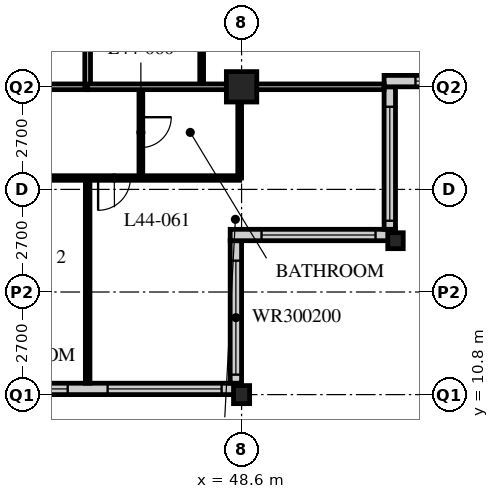
"""IFC4 building model, lengths in metres.
Left out: names, types, materials, properties, quantities, classifications, styles, units other than length and angle.
Written with IfcOpenShell. Run it as: python <this file> out.ifc"""

import sys

from ifc_helpers import new_model, si_unit, direction, frame, frame_2d, origin, origin_2d, place, context, subcontext, project, spatial, rectangle, hollow_rectangle, i_section, extrude, element, fill, save


model = new_model("IFC4")
c1 = context("Model", 3, precision=1e-05, world=origin(), true_north=direction((0.0, 1.0)))
c2 = subcontext(c1, "Body", "Model", "MODEL_VIEW")
j1 = project(units=[si_unit("LENGTHUNIT", "METRE"), si_unit("PLANEANGLEUNIT", "RADIAN")], contexts=[c1])
p1 = place(None, origin())
s1 = spatial("IfcSite", under=j1, at=p1, CompositionType="ELEMENT")
p2 = place(p1, origin())
s2 = spatial("IfcBuilding", under=s1, at=p2, CompositionType="ELEMENT")
p3 = place(p2, frame((0.0, 0.0, 174.0)))
s3 = spatial("IfcBuildingStorey", under=s2, at=p3, CompositionType="ELEMENT", Elevation=174.0)
p4 = place(p3, frame((48.6, 10.8, 0.0), z_axis=(0.0, 0.0, 1.0), x_axis=(1.0, 0.0, 0.0)))
e1 = element("IfcColumn", 1, at=p4, inside=s3, PredefinedType="COLUMN", context=c2, shape_type="SweptSolid", body=[
    extrude(i_section(OverallWidth=0.424, OverallDepth=0.475, WebThickness=0.048, FlangeThickness=0.077, FilletRadius=0.015, at=origin_2d()), origin(), (0.0, 0.0, 1.0), 3.6),
])
p5 = place(p3, frame((48.6, 18.9, 0.0), z_axis=(0.0, 0.0, 1.0), x_axis=(1.0, 0.0, 0.0)))
e2 = element("IfcColumn", 2, at=p5, inside=s3, PredefinedType="COLUMN", context=c2, shape_type="SweptSolid", body=[
    extrude(hollow_rectangle(XDim=0.8, YDim=0.8, WallThickness=0.08, at=origin_2d()), origin(), (0.0, 0.0, 1.0), 3.6),
])
p6 = place(p3, frame((52.65, 14.85, 0.0), z_axis=(0.0, 0.0, 1.0), x_axis=(1.0, 0.0, 0.0)))
e3 = element("IfcColumn", 3, at=p6, inside=s3, PredefinedType="COLUMN", context=c2, shape_type="SweptSolid", body=[
    extrude(i_section(OverallWidth=0.407, OverallDepth=0.419, WebThickness=0.031, FlangeThickness=0.049, FilletRadius=0.015, at=origin_2d()), origin(), (0.0, 0.0, 1.0), 3.6),
])
p7 = place(p3, frame((8.4, 10.95, 0.0), z_axis=(0.0, 0.0, 1.0), x_axis=(1.0, 0.0, 0.0)))
e4 = element("IfcWall", 4, at=p7, inside=s3, PredefinedType="SOLIDWALL", context=c2, shape_type="SweptSolid", body=[
    extrude(rectangle(XDim=40.2, YDim=0.3, at=frame_2d((20.1, 0.0))), origin(), (0.0, 0.0, 1.0), 3.39),
])
p8 = place(p7, frame((0.225, 0.0, 0.6)))
e5 = element("IfcOpeningElement", 5, at=p8, cuts=e4, PredefinedType="OPENING", context=c2, shape_type="SweptSolid", body=[
    extrude(rectangle(XDim=3.0, YDim=2.4, at=frame_2d((1.5, 1.2))), frame((0.0, 0.16, 0.0), z_axis=(0.0, -1.0, 0.0), x_axis=(1.0, 0.0, 0.0)), (0.0, 0.0, 1.0), 0.32),
])
p9 = place(p7, frame((4.275, 0.0, 0.6)))
e6 = element("IfcOpeningElement", 6, at=p9, cuts=e4, PredefinedType="OPENING", context=c2, shape_type="SweptSolid", body=[
    extrude(rectangle(XDim=3.0, YDim=2.4, at=frame_2d((1.5, 1.2))), frame((0.0, 0.16, 0.0), z_axis=(0.0, -1.0, 0.0), x_axis=(1.0, 0.0, 0.0)), (0.0, 0.0, 1.0), 0.32),
])
p10 = place(p7, frame((8.325, 0.0, 0.6)))
e7 = element("IfcOpeningElement", 7, at=p10, cuts=e4, PredefinedType="OPENING", context=c2, shape_type="SweptSolid", body=[
    extrude(rectangle(XDim=3.0, YDim=2.4, at=frame_2d((1.5, 1.2))), frame((0.0, 0.16, 0.0), z_axis=(0.0, -1.0, 0.0), x_axis=(1.0, 0.0, 0.0)), (0.0, 0.0, 1.0), 0.32),
])
p11 = place(p7, frame((12.375, 0.0, 0.6)))
e8 = element("IfcOpeningElement", 8, at=p11, cuts=e4, PredefinedType="OPENING", context=c2, shape_type="SweptSolid", body=[
    extrude(rectangle(XDim=3.0, YDim=2.4, at=frame_2d((1.5, 1.2))), frame((0.0, 0.16, 0.0), z_axis=(0.0, -1.0, 0.0), x_axis=(1.0, 0.0, 0.0)), (0.0, 0.0, 1.0), 0.32),
])
p12 = place(p7, frame((16.425, 0.0, 0.6)))
e9 = element("IfcOpeningElement", 9, at=p12, cuts=e4, PredefinedType="OPENING", context=c2, shape_type="SweptSolid", body=[
    extrude(rectangle(XDim=3.0, YDim=2.4, at=frame_2d((1.5, 1.2))), frame((0.0, 0.16, 0.0), z_axis=(0.0, -1.0, 0.0), x_axis=(1.0, 0.0, 0.0)), (0.0, 0.0, 1.0), 0.32),
])
p13 = place(p7, frame((20.475, 0.0, 0.6)))
e10 = element("IfcOpeningElement", 10, at=p13, cuts=e4, PredefinedType="OPENING", context=c2, shape_type="SweptSolid", body=[
    extrude(rectangle(XDim=3.0, YDim=2.4, at=frame_2d((1.5, 1.2))), frame((0.0, 0.16, 0.0), z_axis=(0.0, -1.0, 0.0), x_axis=(1.0, 0.0, 0.0)), (0.0, 0.0, 1.0), 0.32),
])
p14 = place(p7, frame((24.525, 0.0, 0.6)))
e11 = element("IfcOpeningElement", 11, at=p14, cuts=e4, PredefinedType="OPENING", context=c2, shape_type="SweptSolid", body=[
    extrude(rectangle(XDim=3.0, YDim=2.4, at=frame_2d((1.5, 1.2))), frame((0.0, 0.16, 0.0), z_axis=(0.0, -1.0, 0.0), x_axis=(1.0, 0.0, 0.0)), (0.0, 0.0, 1.0), 0.32),
])
p15 = place(p7, frame((28.575, 0.0, 0.6)))
e12 = element("IfcOpeningElement", 12, at=p15, cuts=e4, PredefinedType="OPENING", context=c2, shape_type="SweptSolid", body=[
    extrude(rectangle(XDim=3.0, YDim=2.4, at=frame_2d((1.5, 1.2))), frame((0.0, 0.16, 0.0), z_axis=(0.0, -1.0, 0.0), x_axis=(1.0, 0.0, 0.0)), (0.0, 0.0, 1.0), 0.32),
])
p16 = place(p7, frame((32.625, 0.0, 0.6)))
e13 = element("IfcOpeningElement", 13, at=p16, cuts=e4, PredefinedType="OPENING", context=c2, shape_type="SweptSolid", body=[
    extrude(rectangle(XDim=3.0, YDim=2.4, at=frame_2d((1.5, 1.2))), frame((0.0, 0.16, 0.0), z_axis=(0.0, -1.0, 0.0), x_axis=(1.0, 0.0, 0.0)), (0.0, 0.0, 1.0), 0.32),
])
p17 = place(p7, frame((36.675, 0.0, 0.6)))
e14 = element("IfcOpeningElement", 14, at=p17, cuts=e4, PredefinedType="OPENING", context=c2, shape_type="SweptSolid", body=[
    extrude(rectangle(XDim=3.0, YDim=2.4, at=frame_2d((1.5, 1.2))), frame((0.0, 0.16, 0.0), z_axis=(0.0, -1.0, 0.0), x_axis=(1.0, 0.0, 0.0)), (0.0, 0.0, 1.0), 0.32),
])
p18 = place(p3, frame((48.45, 11.1, 0.0), z_axis=(0.0, 0.0, 1.0), x_axis=(0.0, 1.0, 0.0)))
e15 = element("IfcWall", 15, at=p18, inside=s3, PredefinedType="SOLIDWALL", context=c2, shape_type="SweptSolid", body=[
    extrude(rectangle(XDim=3.75, YDim=0.3, at=frame_2d((1.875, 0.0))), origin(), (0.0, 0.0, 1.0), 3.39),
])
p19 = place(p18, frame((0.225, 0.0, 0.6)))
e16 = element("IfcOpeningElement", 16, at=p19, cuts=e15, PredefinedType="OPENING", context=c2, shape_type="SweptSolid", body=[
    extrude(rectangle(XDim=3.0, YDim=2.0, at=frame_2d((1.5, 1.0))), frame((0.0, 0.16, 0.0), z_axis=(0.0, -1.0, 0.0), x_axis=(1.0, 0.0, 0.0)), (0.0, 0.0, 1.0), 0.32),
])
p20 = place(p3, frame((48.3, 15.0, 0.0), z_axis=(0.0, 0.0, 1.0), x_axis=(1.0, 0.0, 0.0)))
e17 = element("IfcWall", 17, at=p20, inside=s3, PredefinedType="SOLIDWALL", context=c2, shape_type="SweptSolid", body=[
    extrude(rectangle(XDim=4.35, YDim=0.3, at=frame_2d((2.175, 0.0))), origin(), (0.0, 0.0, 1.0), 3.39),
])
p21 = place(p20, frame((0.825, 0.0, 0.6)))
e18 = element("IfcOpeningElement", 18, at=p21, cuts=e17, PredefinedType="OPENING", context=c2, shape_type="SweptSolid", body=[
    extrude(rectangle(XDim=3.0, YDim=2.0, at=frame_2d((1.5, 1.0))), frame((0.0, 0.16, 0.0), z_axis=(0.0, -1.0, 0.0), x_axis=(1.0, 0.0, 0.0)), (0.0, 0.0, 1.0), 0.32),
])
p22 = place(p3, frame((52.5, 15.15, 0.0), z_axis=(0.0, 0.0, 1.0), x_axis=(0.0, 1.0, 0.0)))
e19 = element("IfcWall", 19, at=p22, inside=s3, PredefinedType="SOLIDWALL", context=c2, shape_type="SweptSolid", body=[
    extrude(rectangle(XDim=3.75, YDim=0.3, at=frame_2d((1.875, 0.0))), origin(), (0.0, 0.0, 1.0), 3.39),
])
p23 = place(p22, frame((0.225, 0.0, 0.6)))
e20 = element("IfcOpeningElement", 20, at=p23, cuts=e19, PredefinedType="OPENING", context=c2, shape_type="SweptSolid", body=[
    extrude(rectangle(XDim=3.0, YDim=2.0, at=frame_2d((1.5, 1.0))), frame((0.0, 0.16, 0.0), z_axis=(0.0, -1.0, 0.0), x_axis=(1.0, 0.0, 0.0)), (0.0, 0.0, 1.0), 0.32),
])
p24 = place(p3, frame((52.35, 19.05, 0.0), z_axis=(0.0, 0.0, 1.0), x_axis=(1.0, 0.0, 0.0)))
e21 = element("IfcWall", 21, at=p24, inside=s3, PredefinedType="SOLIDWALL", context=c2, shape_type="SweptSolid", body=[
    extrude(rectangle(XDim=4.35, YDim=0.3, at=frame_2d((2.175, 0.0))), origin(), (0.0, 0.0, 1.0), 3.39),
])
p25 = place(p24, frame((0.825, 0.0, 0.6)))
e22 = element("IfcOpeningElement", 22, at=p25, cuts=e21, PredefinedType="OPENING", context=c2, shape_type="SweptSolid", body=[
    extrude(rectangle(XDim=3.0, YDim=2.0, at=frame_2d((1.5, 1.0))), frame((0.0, 0.16, 0.0), z_axis=(0.0, -1.0, 0.0), x_axis=(1.0, 0.0, 0.0)), (0.0, 0.0, 1.0), 0.32),
])
p26 = place(p3, frame((12.15, 18.9, 0.0), z_axis=(0.0, 0.0, 1.0), x_axis=(1.0, 0.0, 0.0)))
e23 = element("IfcWall", 23, at=p26, inside=s3, PredefinedType="PARTITIONING", context=c2, shape_type="SweptSolid", body=[
    extrude(rectangle(XDim=32.4, YDim=0.15, at=frame_2d((16.2, 0.0))), origin(), (0.0, 0.0, 1.0), 2.778),
])
p27 = place(p26, frame((6.4, 0.0, 0.0)))
e24 = element("IfcOpeningElement", 24, at=p27, cuts=e23, PredefinedType="OPENING", context=c2, shape_type="SweptSolid", body=[
    extrude(rectangle(XDim=1.0, YDim=2.1, at=frame_2d((0.5, 1.05))), frame((0.0, 0.085, 0.0), z_axis=(0.0, -1.0, 0.0), x_axis=(1.0, 0.0, 0.0)), (0.0, 0.0, 1.0), 0.17),
])
p28 = place(p26, frame((8.8, 0.0, 0.0)))
e25 = element("IfcOpeningElement", 25, at=p28, cuts=e23, PredefinedType="OPENING", context=c2, shape_type="SweptSolid", body=[
    extrude(rectangle(XDim=1.0, YDim=2.1, at=frame_2d((0.5, 1.05))), frame((0.0, 0.085, 0.0), z_axis=(0.0, -1.0, 0.0), x_axis=(1.0, 0.0, 0.0)), (0.0, 0.0, 1.0), 0.17),
])
p29 = place(p26, frame((13.05, 0.0, 0.0)))
e26 = element("IfcOpeningElement", 26, at=p29, cuts=e23, PredefinedType="OPENING", context=c2, shape_type="SweptSolid", body=[
    extrude(rectangle(XDim=1.0, YDim=2.1, at=frame_2d((0.5, 1.05))), frame((0.0, 0.085, 0.0), z_axis=(0.0, -1.0, 0.0), x_axis=(1.0, 0.0, 0.0)), (0.0, 0.0, 1.0), 0.17),
])
p30 = place(p26, frame((22.6, 0.0, 0.0)))
e27 = element("IfcOpeningElement", 27, at=p30, cuts=e23, PredefinedType="OPENING", context=c2, shape_type="SweptSolid", body=[
    extrude(rectangle(XDim=1.0, YDim=2.1, at=frame_2d((0.5, 1.05))), frame((0.0, 0.085, 0.0), z_axis=(0.0, -1.0, 0.0), x_axis=(1.0, 0.0, 0.0)), (0.0, 0.0, 1.0), 0.17),
])
p31 = place(p26, frame((25.0, 0.0, 0.0)))
e28 = element("IfcOpeningElement", 28, at=p31, cuts=e23, PredefinedType="OPENING", context=c2, shape_type="SweptSolid", body=[
    extrude(rectangle(XDim=1.0, YDim=2.1, at=frame_2d((0.5, 1.05))), frame((0.0, 0.085, 0.0), z_axis=(0.0, -1.0, 0.0), x_axis=(1.0, 0.0, 0.0)), (0.0, 0.0, 1.0), 0.17),
])
p32 = place(p26, frame((1.525, 0.0, 0.0)))
e29 = element("IfcOpeningElement", 29, at=p32, cuts=e23, PredefinedType="OPENING", context=c2, shape_type="SweptSolid", body=[
    extrude(rectangle(XDim=1.0, YDim=2.1, at=frame_2d((0.5, 1.05))), frame((0.0, 0.085, 0.0), z_axis=(0.0, -1.0, 0.0), x_axis=(1.0, 0.0, 0.0)), (0.0, 0.0, 1.0), 0.17),
])
p33 = place(p26, frame((29.875, 0.0, 0.0)))
e30 = element("IfcOpeningElement", 30, at=p33, cuts=e23, PredefinedType="OPENING", context=c2, shape_type="SweptSolid", body=[
    extrude(rectangle(XDim=1.0, YDim=2.1, at=frame_2d((0.5, 1.05))), frame((0.0, 0.085, 0.0), z_axis=(0.0, -1.0, 0.0), x_axis=(1.0, 0.0, 0.0)), (0.0, 0.0, 1.0), 0.17),
])
p34 = place(p3, frame((44.55, 18.9, 0.0), z_axis=(0.0, 0.0, 1.0), x_axis=(0.0, 1.0, 0.0)))
e31 = element("IfcWall", 31, at=p34, inside=s3, PredefinedType="PARTITIONING", context=c2, shape_type="SweptSolid", body=[
    extrude(rectangle(XDim=24.3, YDim=0.15, at=frame_2d((12.15, 0.0))), origin(), (0.0, 0.0, 1.0), 3.39),
])
p35 = place(p34, frame((2.35, 0.0, 0.0)))
e32 = element("IfcOpeningElement", 32, at=p35, cuts=e31, PredefinedType="OPENING", context=c2, shape_type="SweptSolid", body=[
    extrude(rectangle(XDim=1.0, YDim=2.1, at=frame_2d((0.5, 1.05))), frame((0.0, 0.085, 0.0), z_axis=(0.0, -1.0, 0.0), x_axis=(1.0, 0.0, 0.0)), (0.0, 0.0, 1.0), 0.17),
])
p36 = place(p34, frame((4.45, 0.0, 0.0)))
e33 = element("IfcOpeningElement", 33, at=p36, cuts=e31, PredefinedType="OPENING", context=c2, shape_type="SweptSolid", body=[
    extrude(rectangle(XDim=1.0, YDim=2.1, at=frame_2d((0.5, 1.05))), frame((0.0, 0.085, 0.0), z_axis=(0.0, -1.0, 0.0), x_axis=(1.0, 0.0, 0.0)), (0.0, 0.0, 1.0), 0.17),
])
p37 = place(p34, frame((18.55, 0.0, 0.0)))
e34 = element("IfcOpeningElement", 34, at=p37, cuts=e31, PredefinedType="OPENING", context=c2, shape_type="SweptSolid", body=[
    extrude(rectangle(XDim=1.0, YDim=2.1, at=frame_2d((0.5, 1.05))), frame((0.0, 0.085, 0.0), z_axis=(0.0, -1.0, 0.0), x_axis=(1.0, 0.0, 0.0)), (0.0, 0.0, 1.0), 0.17),
])
p38 = place(p34, frame((22.6, 0.0, 0.0)))
e35 = element("IfcOpeningElement", 35, at=p38, cuts=e31, PredefinedType="OPENING", context=c2, shape_type="SweptSolid", body=[
    extrude(rectangle(XDim=1.0, YDim=2.1, at=frame_2d((0.5, 1.05))), frame((0.0, 0.085, 0.0), z_axis=(0.0, -1.0, 0.0), x_axis=(1.0, 0.0, 0.0)), (0.0, 0.0, 1.0), 0.17),
])
p39 = place(p3, frame((47.55, 18.9, 0.0), z_axis=(0.0, 0.0, 1.0), x_axis=(0.0, 1.0, 0.0)))
e36 = element("IfcWall", 36, at=p39, inside=s3, PredefinedType="PARTITIONING", context=c2, shape_type="SweptSolid", body=[
    extrude(rectangle(XDim=2.2, YDim=0.1, at=frame_2d((1.1, 0.0))), origin(), (0.0, 0.0, 1.0), 3.39),
])
p40 = place(p3, frame((40.5, 16.5, 0.0), z_axis=(0.0, 0.0, 1.0), x_axis=(1.0, 0.0, 0.0)))
e37 = element("IfcWall", 37, at=p40, inside=s3, PredefinedType="PARTITIONING", context=c2, shape_type="SweptSolid", body=[
    extrude(rectangle(XDim=8.05, YDim=0.12, at=frame_2d((4.025, 0.0))), origin(), (0.0, 0.0, 1.0), 3.39),
])
p41 = place(p40, frame((0.475, 0.0, 0.0)))
e38 = element("IfcOpeningElement", 38, at=p41, cuts=e37, PredefinedType="OPENING", context=c2, shape_type="SweptSolid", body=[
    extrude(rectangle(XDim=0.85, YDim=2.1, at=frame_2d((0.425, 1.05))), frame((0.0, 0.07, 0.0), z_axis=(0.0, -1.0, 0.0), x_axis=(1.0, 0.0, 0.0)), (0.0, 0.0, 1.0), 0.14),
])
p42 = place(p40, frame((4.325, 0.0, 0.0)))
e39 = element("IfcOpeningElement", 39, at=p42, cuts=e37, PredefinedType="OPENING", context=c2, shape_type="SweptSolid", body=[
    extrude(rectangle(XDim=0.85, YDim=2.1, at=frame_2d((0.425, 1.05))), frame((0.0, 0.07, 0.0), z_axis=(0.0, -1.0, 0.0), x_axis=(1.0, 0.0, 0.0)), (0.0, 0.0, 1.0), 0.14),
])
p43 = place(p3, frame((45.95, 18.9, 0.0), z_axis=(0.0, 0.0, 1.0), x_axis=(0.0, -1.0, 0.0)))
e40 = element("IfcWall", 40, at=p43, inside=s3, PredefinedType="PARTITIONING", context=c2, shape_type="SweptSolid", body=[
    extrude(rectangle(XDim=2.4, YDim=0.1, at=frame_2d((1.2, 0.0))), origin(), (0.0, 0.0, 1.0), 3.39),
])
p44 = place(p43, frame((0.8, 0.0, 0.0)))
e41 = element("IfcOpeningElement", 41, at=p44, cuts=e40, PredefinedType="OPENING", context=c2, shape_type="SweptSolid", body=[
    extrude(rectangle(XDim=0.8, YDim=2.1, at=frame_2d((0.4, 1.05))), frame((0.0, 0.06, 0.0), z_axis=(0.0, -1.0, 0.0), x_axis=(1.0, 0.0, 0.0)), (0.0, 0.0, 1.0), 0.12),
])
p45 = place(p3, frame((48.55, 18.9, 0.0), z_axis=(0.0, 0.0, 1.0), x_axis=(0.0, -1.0, 0.0)))
e42 = element("IfcWall", 42, at=p45, inside=s3, PredefinedType="PARTITIONING", context=c2, shape_type="SweptSolid", body=[
    extrude(rectangle(XDim=2.4, YDim=0.1, at=frame_2d((1.2, 0.0))), origin(), (0.0, 0.0, 1.0), 2.778),
])
p46 = place(p3, frame((44.55, 16.5, 0.0), z_axis=(0.0, 0.0, 1.0), x_axis=(0.0, -1.0, 0.0)))
e43 = element("IfcWall", 43, at=p46, inside=s3, PredefinedType="PARTITIONING", context=c2, shape_type="SweptSolid", body=[
    extrude(rectangle(XDim=5.4, YDim=0.12, at=frame_2d((2.7, 0.0))), origin(), (0.0, 0.0, 1.0), 3.39),
])
p47 = place(p3, frame((44.55, 18.9, 0.0), z_axis=(0.0, 0.0, 1.0), x_axis=(1.0, 0.0, 0.0)))
e44 = element("IfcWall", 44, at=p47, inside=s3, PredefinedType="PARTITIONING", context=c2, shape_type="SweptSolid", body=[
    extrude(rectangle(XDim=7.8, YDim=0.15, at=frame_2d((3.9, 0.0))), origin(), (0.0, 0.0, 1.0), 2.778),
])
p48 = place(p16, origin())
e45 = element("IfcWindow", 45, at=p48, inside=s3, PartitioningType="SINGLE_PANEL", PredefinedType="WINDOW", context=c2, shape_type="SweptSolid", body=[
    extrude(rectangle(XDim=3.0, YDim=2.4, at=frame_2d((1.5, 1.2))), frame((0.0, 0.03, 0.0), z_axis=(0.0, -1.0, 0.0), x_axis=(1.0, 0.0, 0.0)), (0.0, 0.0, 1.0), 0.06),
])
fill(e13, e45)
p49 = place(p17, origin())
e46 = element("IfcWindow", 46, at=p49, inside=s3, PartitioningType="SINGLE_PANEL", PredefinedType="WINDOW", context=c2, shape_type="SweptSolid", body=[
    extrude(rectangle(XDim=3.0, YDim=2.4, at=frame_2d((1.5, 1.2))), frame((0.0, 0.03, 0.0), z_axis=(0.0, -1.0, 0.0), x_axis=(1.0, 0.0, 0.0)), (0.0, 0.0, 1.0), 0.06),
])
fill(e14, e46)
p50 = place(p19, origin())
e47 = element("IfcWindow", 47, at=p50, inside=s3, PartitioningType="SINGLE_PANEL", PredefinedType="WINDOW", context=c2, shape_type="SweptSolid", body=[
    extrude(rectangle(XDim=3.0, YDim=2.0, at=frame_2d((1.5, 1.0))), frame((0.0, 0.03, 0.0), z_axis=(0.0, -1.0, 0.0), x_axis=(1.0, 0.0, 0.0)), (0.0, 0.0, 1.0), 0.06),
])
fill(e16, e47)
p51 = place(p21, origin())
e48 = element("IfcWindow", 48, at=p51, inside=s3, PartitioningType="SINGLE_PANEL", PredefinedType="WINDOW", context=c2, shape_type="SweptSolid", body=[
    extrude(rectangle(XDim=3.0, YDim=2.0, at=frame_2d((1.5, 1.0))), frame((0.0, 0.03, 0.0), z_axis=(0.0, -1.0, 0.0), x_axis=(1.0, 0.0, 0.0)), (0.0, 0.0, 1.0), 0.06),
])
fill(e18, e48)
p52 = place(p23, origin())
e49 = element("IfcWindow", 49, at=p52, inside=s3, PartitioningType="SINGLE_PANEL", PredefinedType="WINDOW", context=c2, shape_type="SweptSolid", body=[
    extrude(rectangle(XDim=3.0, YDim=2.0, at=frame_2d((1.5, 1.0))), frame((0.0, 0.03, 0.0), z_axis=(0.0, -1.0, 0.0), x_axis=(1.0, 0.0, 0.0)), (0.0, 0.0, 1.0), 0.06),
])
fill(e20, e49)
p53 = place(p25, origin())
e50 = element("IfcWindow", 50, at=p53, inside=s3, PartitioningType="SINGLE_PANEL", PredefinedType="WINDOW", context=c2, shape_type="SweptSolid", body=[
    extrude(rectangle(XDim=3.0, YDim=2.0, at=frame_2d((1.5, 1.0))), frame((0.0, 0.03, 0.0), z_axis=(0.0, -1.0, 0.0), x_axis=(1.0, 0.0, 0.0)), (0.0, 0.0, 1.0), 0.06),
])
fill(e22, e50)
p54 = place(p44, origin())
e51 = element("IfcDoor", 51, at=p54, inside=s3, OperationType="SINGLE_SWING_LEFT", PredefinedType="DOOR", context=c2, shape_type="SweptSolid", body=[
    extrude(rectangle(XDim=0.8, YDim=2.1, at=frame_2d((0.4, 1.05))), frame((0.0, 0.025, 0.0), z_axis=(0.0, -1.0, 0.0), x_axis=(1.0, 0.0, 0.0)), (0.0, 0.0, 1.0), 0.05),
])
fill(e41, e51)
p55 = place(p42, origin())
e52 = element("IfcDoor", 52, at=p55, inside=s3, OperationType="SINGLE_SWING_RIGHT", PredefinedType="DOOR", context=c2, shape_type="SweptSolid", body=[
    extrude(rectangle(XDim=0.85, YDim=2.1, at=frame_2d((0.425, 1.05))), frame((0.0, 0.025, 0.0), z_axis=(0.0, -1.0, 0.0), x_axis=(1.0, 0.0, 0.0)), (0.0, 0.0, 1.0), 0.05),
])
fill(e39, e52)
save(model, sys.argv[1])
